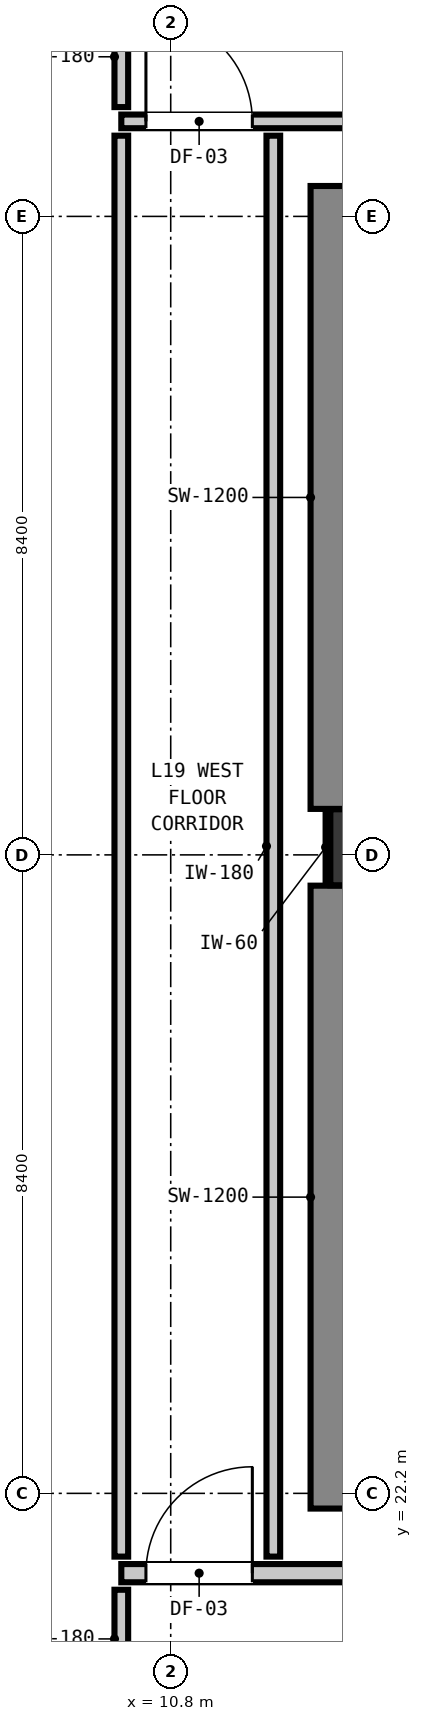
"""IFC4 building model, lengths in metres.
Left out: names, types, materials, properties, quantities, classifications, styles, units other than length and angle.
Written with IfcOpenShell. Run it as: python <this file> out.ifc"""

import sys

from ifc_helpers import new_model, si_unit, direction, frame, frame_2d, origin, origin_2d, place, context, subcontext, project, spatial, rectangle, extrude, element, fill, save


model = new_model("IFC4")
c1 = context("Model", 3, precision=1e-05, world=origin(), true_north=direction((0.0, 1.0)))
c2 = subcontext(c1, "Body", "Model", "MODEL_VIEW")
j1 = project(units=[si_unit("LENGTHUNIT", "METRE"), si_unit("PLANEANGLEUNIT", "RADIAN")], contexts=[c1])
p1 = place(None, origin())
s1 = spatial("IfcSite", under=j1, at=p1, CompositionType="ELEMENT")
p2 = place(p1, origin())
s2 = spatial("IfcBuilding", under=s1, at=p2, CompositionType="ELEMENT")
p3 = place(p2, frame((0.0, 0.0, 68.48)))
s3 = spatial("IfcBuildingStorey", under=s2, at=p3, CompositionType="ELEMENT", Elevation=68.48)
p4 = place(p3, frame((13.4, 30.7, 0.0), z_axis=(0.0, 0.0, 1.0), x_axis=(1.0, 0.0, 0.0)))
e1 = element("IfcColumn", 1, at=p4, inside=s3, PredefinedType="COLUMN", context=c2, shape_type="SweptSolid", body=[
    extrude(rectangle(XDim=1.0, YDim=1.0, at=origin_2d()), origin(), (0.0, 0.0, 1.0), 3.32),
])
p5 = place(p3, frame((13.24, 22.0, 0.0), z_axis=(0.0, 0.0, 1.0), x_axis=(0.0, 1.0, 0.0)))
e2 = element("IfcWall", 2, at=p5, inside=s3, PredefinedType="SHEAR", context=c2, shape_type="SweptSolid", body=[
    extrude(rectangle(XDim=8.195, YDim=1.2, at=frame_2d((4.098, 0.0))), origin(), (0.0, 0.0, 1.0), 3.32),
])
p6 = place(p3, frame((13.24, 31.205, 0.0), z_axis=(0.0, 0.0, 1.0), x_axis=(0.0, 1.0, 0.0)))
e3 = element("IfcWall", 3, at=p6, inside=s3, PredefinedType="SHEAR", context=c2, shape_type="SweptSolid", body=[
    extrude(rectangle(XDim=8.195, YDim=1.2, at=frame_2d((4.097, 0.0))), origin(), (0.0, 0.0, 1.0), 3.32),
])
p7 = place(p3, frame((10.15, 21.15, 0.0), z_axis=(0.0, 0.0, 1.0), x_axis=(1.0, 0.0, 0.0)))
e4 = element("IfcWall", 4, at=p7, inside=s3, PredefinedType="PARTITIONING", context=c2, shape_type="SweptSolid", body=[
    extrude(rectangle(XDim=26.779, YDim=0.24, at=frame_2d((13.39, 0.0))), origin(), (0.0, 0.0, 1.0), 3.06),
])
p8 = place(p7, frame((8.06, 0.0, 0.0)))
e5 = element("IfcOpeningElement", 5, at=p8, cuts=e4, PredefinedType="OPENING", context=c2, shape_type="SweptSolid", body=[
    extrude(rectangle(XDim=1.1, YDim=2.15, at=frame_2d((0.55, 1.075))), frame((0.0, 0.13, 0.0), z_axis=(0.0, -1.0, 0.0), x_axis=(1.0, 0.0, 0.0)), (0.0, 0.0, 1.0), 0.26),
])
p9 = place(p7, frame((0.324, 0.0, 0.0)))
e6 = element("IfcOpeningElement", 6, at=p9, cuts=e4, PredefinedType="OPENING", context=c2, shape_type="SweptSolid", body=[
    extrude(rectangle(XDim=1.4, YDim=2.15, at=frame_2d((0.7, 1.075))), frame((0.0, 0.13, 0.0), z_axis=(0.0, -1.0, 0.0), x_axis=(1.0, 0.0, 0.0)), (0.0, 0.0, 1.0), 0.26),
])
p10 = place(p3, frame((10.15, 40.25, 0.0), z_axis=(0.0, 0.0, 1.0), x_axis=(1.0, 0.0, 0.0)))
e7 = element("IfcWall", 7, at=p10, inside=s3, PredefinedType="PARTITIONING", context=c2, shape_type="SweptSolid", body=[
    extrude(rectangle(XDim=40.023, YDim=0.18, at=frame_2d((20.012, 0.0))), origin(), (0.0, 0.0, 1.0), 3.06),
])
p11 = place(p10, frame((7.285, 0.0, 0.0)))
e8 = element("IfcOpeningElement", 8, at=p11, cuts=e7, PredefinedType="OPENING", context=c2, shape_type="SweptSolid", body=[
    extrude(rectangle(XDim=1.4, YDim=2.15, at=frame_2d((0.7, 1.075))), frame((0.0, 0.1, 0.0), z_axis=(0.0, -1.0, 0.0), x_axis=(1.0, 0.0, 0.0)), (0.0, 0.0, 1.0), 0.2),
])
p12 = place(p10, frame((0.324, 0.0, 0.0)))
e9 = element("IfcOpeningElement", 9, at=p12, cuts=e7, PredefinedType="OPENING", context=c2, shape_type="SweptSolid", body=[
    extrude(rectangle(XDim=1.4, YDim=2.15, at=frame_2d((0.7, 1.075))), frame((0.0, 0.1, 0.0), z_axis=(0.0, -1.0, 0.0), x_axis=(1.0, 0.0, 0.0)), (0.0, 0.0, 1.0), 0.2),
])
p13 = place(p10, frame((33.574, 0.0, 0.0)))
e10 = element("IfcOpeningElement", 10, at=p13, cuts=e7, PredefinedType="OPENING", context=c2, shape_type="SweptSolid", body=[
    extrude(rectangle(XDim=1.0, YDim=2.15, at=frame_2d((0.5, 1.075))), frame((0.0, 0.1, 0.0), z_axis=(0.0, -1.0, 0.0), x_axis=(1.0, 0.0, 0.0)), (0.0, 0.0, 1.0), 0.2),
])
p14 = place(p3, frame((10.15, 19.638, 0.0), z_axis=(0.0, 0.0, 1.0), x_axis=(0.0, 1.0, 0.0)))
e11 = element("IfcWall", 11, at=p14, inside=s3, PredefinedType="PARTITIONING", context=c2, shape_type="SweptSolid", body=[
    extrude(rectangle(XDim=1.294, YDim=0.18, at=frame_2d((0.647, 0.0))), origin(), (0.0, 0.0, 1.0), 2.445),
])
p15 = place(p3, frame((10.15, 21.368, 0.0), z_axis=(0.0, 0.0, 1.0), x_axis=(0.0, 1.0, 0.0)))
e12 = element("IfcWall", 12, at=p15, inside=s3, PredefinedType="PARTITIONING", context=c2, shape_type="SweptSolid", body=[
    extrude(rectangle(XDim=18.694, YDim=0.18, at=frame_2d((9.347, 0.0))), origin(), (0.0, 0.0, 1.0), 3.06),
])
p16 = place(p3, frame((10.15, 40.438, 0.0), z_axis=(0.0, 0.0, 1.0), x_axis=(0.0, 1.0, 0.0)))
e13 = element("IfcWall", 13, at=p16, inside=s3, PredefinedType="PARTITIONING", context=c2, shape_type="SweptSolid", body=[
    extrude(rectangle(XDim=1.324, YDim=0.18, at=frame_2d((0.662, 0.0))), origin(), (0.0, 0.0, 1.0), 3.06),
])
p17 = place(p3, frame((12.15, 21.368, 0.0), z_axis=(0.0, 0.0, 1.0), x_axis=(0.0, 1.0, 0.0)))
e14 = element("IfcWall", 14, at=p17, inside=s3, PredefinedType="PARTITIONING", context=c2, shape_type="SweptSolid", body=[
    extrude(rectangle(XDim=18.694, YDim=0.18, at=frame_2d((9.347, 0.0))), origin(), (0.0, 0.0, 1.0), 3.06),
])
p18 = place(p3, frame((12.868, 30.21, 0.0), z_axis=(0.0, 0.0, 1.0), x_axis=(0.0, 1.0, 0.0)))
e15 = element("IfcWall", 15, at=p18, inside=s3, PredefinedType="PARTITIONING", context=c2, shape_type="SweptSolid", body=[
    extrude(rectangle(XDim=0.98, YDim=0.06, at=frame_2d((0.49, 0.0))), origin(), (0.0, 0.0, 1.0), 1.45),
])
p19 = place(p9, origin())
e16 = element("IfcDoor", 16, at=p19, inside=s3, OperationType="SINGLE_SWING_RIGHT", PredefinedType="DOOR", context=c2, shape_type="SweptSolid", body=[
    extrude(rectangle(XDim=1.4, YDim=2.15, at=frame_2d((0.7, 1.075))), frame((0.0, 0.025, 0.0), z_axis=(0.0, -1.0, 0.0), x_axis=(1.0, 0.0, 0.0)), (0.0, 0.0, 1.0), 0.05),
])
fill(e6, e16)
p20 = place(p12, origin())
e17 = element("IfcDoor", 17, at=p20, inside=s3, OperationType="SINGLE_SWING_LEFT", PredefinedType="DOOR", context=c2, shape_type="SweptSolid", body=[
    extrude(rectangle(XDim=1.4, YDim=2.15, at=frame_2d((0.7, 1.075))), frame((0.0, 0.025, 0.0), z_axis=(0.0, -1.0, 0.0), x_axis=(1.0, 0.0, 0.0)), (0.0, 0.0, 1.0), 0.05),
])
fill(e9, e17)
save(model, sys.argv[1])
